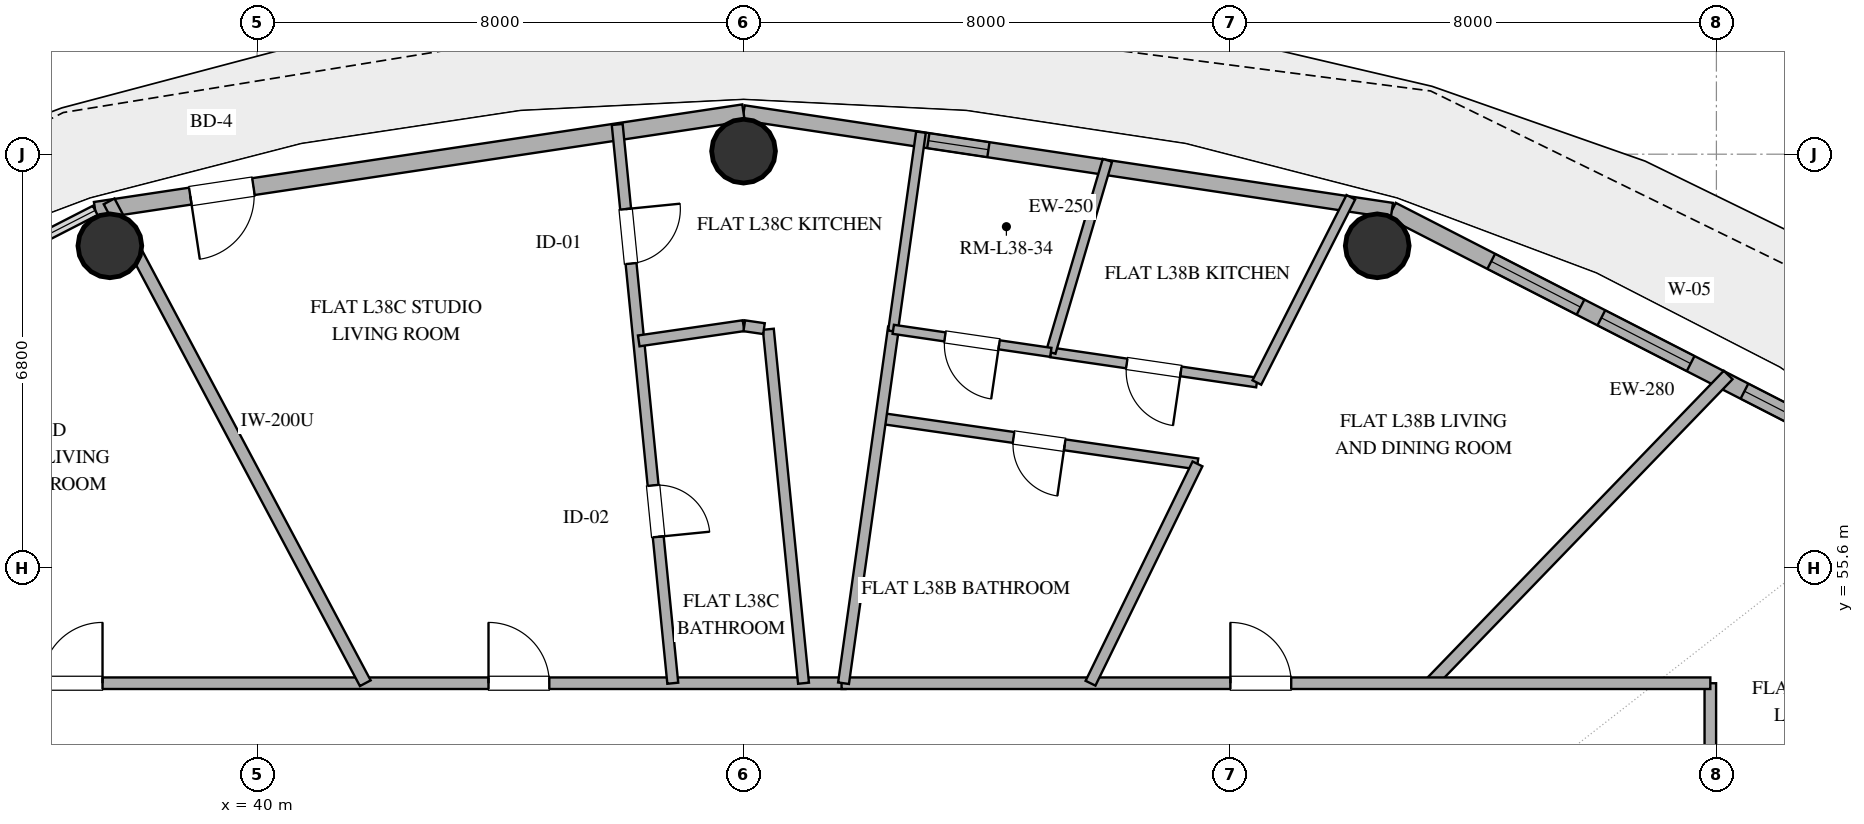
"""IFC4 building model, lengths in metres.
Left out: names, types, materials, properties, quantities, classifications, styles, units other than length and angle.
Written with IfcOpenShell. Run it as: python <this file> out.ifc"""

import sys

from ifc_helpers import new_model, si_unit, direction, frame, frame_2d, origin, origin_2d, place, context, subcontext, project, spatial, rectangle, hollow_circle, extrude, element, fill, save


model = new_model("IFC4")
c1 = context("Model", 3, precision=1e-05, world=origin(), true_north=direction((0.0, 1.0)))
c2 = subcontext(c1, "Body", "Model", "MODEL_VIEW")
j1 = project(units=[si_unit("LENGTHUNIT", "METRE"), si_unit("PLANEANGLEUNIT", "RADIAN")], contexts=[c1])
p1 = place(None, origin())
s1 = spatial("IfcSite", under=j1, at=p1, CompositionType="ELEMENT")
p2 = place(p1, origin())
s2 = spatial("IfcBuilding", under=s1, at=p2, CompositionType="ELEMENT")
p3 = place(p2, frame((0.0, 0.0, 154.2)))
s3 = spatial("IfcBuildingStorey", under=s2, at=p3, CompositionType="ELEMENT", Elevation=154.2)
for number, where, z_axis, x_axis in (
    (1, (58.422, 60.893, 0.0), (0.0, 0.0, 1.0), (1.0, 0.0, 0.0)),
    (2, (48.0, 62.45, 0.0), (0.0, 0.0, 1.0), (1.0, 0.0, 0.0)),
    (3, (37.578, 60.893, 0.0), (0.0, 0.0, 1.0), (1.0, 0.0, 0.0)),
):
    element("IfcColumn", number, at=place(p3, frame(where, z_axis=z_axis, x_axis=x_axis)), inside=s3, PredefinedType="COLUMN", context=c2, shape_type="SweptSolid", body=[
        extrude(hollow_circle(Radius=0.525, WallThickness=0.028, at=origin_2d()), origin(), (0.0, 0.0, 1.0), 3.38),
    ])
p4 = place(p3, frame((67.576, 56.906, 0.0), z_axis=(0.0, 0.0, 1.0), x_axis=(-0.889872523182, 0.456209263919, 0.0)))
e4 = element("IfcWall", 4, at=p4, inside=s3, PredefinedType="SOLIDWALL", context=c2, shape_type="SweptSolid", body=[
    extrude(rectangle(XDim=10.016, YDim=0.28, at=frame_2d((5.008, 0.0))), origin(), (0.0, 0.0, 1.0), 3.38),
])
p5 = place(p4, frame((1.7, 0.0, 0.85)))
e5 = element("IfcOpeningElement", 5, at=p5, cuts=e4, PredefinedType="OPENING", context=c2, shape_type="SweptSolid", body=[
    extrude(rectangle(XDim=1.8, YDim=2.2, at=frame_2d((0.9, 1.1))), frame((0.0, 0.15, 0.0), z_axis=(0.0, -1.0, 0.0), x_axis=(1.0, 0.0, 0.0)), (0.0, 0.0, 1.0), 0.3),
])
p6 = place(p4, frame((4.495, 0.0, 0.85)))
e6 = element("IfcOpeningElement", 6, at=p6, cuts=e4, PredefinedType="OPENING", context=c2, shape_type="SweptSolid", body=[
    extrude(rectangle(XDim=1.65, YDim=2.0, at=frame_2d((0.825, 1.0))), frame((0.0, 0.15, 0.0), z_axis=(0.0, -1.0, 0.0), x_axis=(1.0, 0.0, 0.0)), (0.0, 0.0, 1.0), 0.3),
])
p7 = place(p4, frame((6.53, 0.0, 0.85)))
e7 = element("IfcOpeningElement", 7, at=p7, cuts=e4, PredefinedType="OPENING", context=c2, shape_type="SweptSolid", body=[
    extrude(rectangle(XDim=1.65, YDim=2.0, at=frame_2d((0.825, 1.0))), frame((0.0, 0.15, 0.0), z_axis=(0.0, -1.0, 0.0), x_axis=(1.0, 0.0, 0.0)), (0.0, 0.0, 1.0), 0.3),
])
p8 = place(p3, frame((58.663, 61.475, 0.0), z_axis=(0.0, 0.0, 1.0), x_axis=(-0.988863993413, 0.148822049884, 0.0)))
e8 = element("IfcWall", 8, at=p8, inside=s3, PredefinedType="SOLIDWALL", context=c2, shape_type="SweptSolid", body=[
    extrude(rectangle(XDim=10.783, YDim=0.25, at=frame_2d((5.392, 0.0))), origin(), (0.0, 0.0, 1.0), 3.38),
])
p9 = place(p8, frame((6.71, 0.0, 0.35)))
e9 = element("IfcOpeningElement", 9, at=p9, cuts=e8, PredefinedType="OPENING", context=c2, shape_type="SweptSolid", body=[
    extrude(rectangle(XDim=1.0, YDim=1.05, at=frame_2d((0.5, 0.525))), frame((0.0, 0.135, 0.0), z_axis=(0.0, -1.0, 0.0), x_axis=(1.0, 0.0, 0.0)), (0.0, 0.0, 1.0), 0.27),
])
p10 = place(p3, frame((48.0, 63.08, 0.0), z_axis=(0.0, 0.0, 1.0), x_axis=(-0.988863993413, -0.148822049884, 0.0)))
e10 = element("IfcWall", 10, at=p10, inside=s3, PredefinedType="SOLIDWALL", context=c2, shape_type="SweptSolid", body=[
    extrude(rectangle(XDim=10.783, YDim=0.28, at=frame_2d((5.392, 0.0))), origin(), (0.0, 0.0, 1.0), 3.38),
])
p11 = place(p10, frame((8.151, 0.0, 0.0)))
e11 = element("IfcOpeningElement", 11, at=p11, cuts=e10, PredefinedType="OPENING", context=c2, shape_type="SweptSolid", body=[
    extrude(rectangle(XDim=1.05, YDim=2.2, at=frame_2d((0.525, 1.1))), frame((0.0, 0.15, 0.0), z_axis=(0.0, -1.0, 0.0), x_axis=(1.0, 0.0, 0.0)), (0.0, 0.0, 1.0), 0.3),
])
p12 = place(p3, frame((32.1, 53.7, 0.0), z_axis=(0.0, 0.0, 1.0), x_axis=(1.0, 0.0, 0.0)))
e12 = element("IfcWall", 12, at=p12, inside=s3, PredefinedType="PARTITIONING", context=c2, shape_type="SweptSolid", body=[
    extrude(rectangle(XDim=17.576, YDim=0.19, at=frame_2d((8.788, 0.0))), origin(), (0.0, 0.0, 1.0), 2.74),
])
p13 = place(p12, frame((4.358, 0.0, 0.0)))
e13 = element("IfcOpeningElement", 13, at=p13, cuts=e12, PredefinedType="OPENING", context=c2, shape_type="SweptSolid", body=[
    extrude(rectangle(XDim=1.0, YDim=2.2, at=frame_2d((0.5, 1.1))), frame((0.0, 0.105, 0.0), z_axis=(0.0, -1.0, 0.0), x_axis=(1.0, 0.0, 0.0)), (0.0, 0.0, 1.0), 0.21),
])
p14 = place(p12, frame((11.706, 0.0, 0.0)))
e14 = element("IfcOpeningElement", 14, at=p14, cuts=e12, PredefinedType="OPENING", context=c2, shape_type="SweptSolid", body=[
    extrude(rectangle(XDim=1.0, YDim=2.2, at=frame_2d((0.5, 1.1))), frame((0.0, 0.105, 0.0), z_axis=(0.0, -1.0, 0.0), x_axis=(1.0, 0.0, 0.0)), (0.0, 0.0, 1.0), 0.21),
])
p15 = place(p3, frame((37.566, 61.624, 0.0), z_axis=(0.0, 0.0, 1.0), x_axis=(0.469466796814, -0.882950126955, 0.0)))
e15 = element("IfcWall", 15, at=p15, inside=s3, PredefinedType="PARTITIONING", context=c2, shape_type="SweptSolid", body=[
    extrude(rectangle(XDim=8.975, YDim=0.2, at=frame_2d((4.487, 0.0))), origin(), (0.0, 0.0, 1.0), 2.74),
])
p16 = place(p3, frame((64.194, 58.769, 0.0), z_axis=(0.0, 0.0, 1.0), x_axis=(-0.694647685064, -0.719350118952, 0.0)))
e16 = element("IfcWall", 16, at=p16, inside=s3, PredefinedType="PARTITIONING", context=c2, shape_type="SweptSolid", body=[
    extrude(rectangle(XDim=7.047, YDim=0.2, at=frame_2d((3.523, 0.0))), origin(), (0.0, 0.0, 1.0), 2.74),
])
p17 = place(p3, frame((63.9, 53.7, 0.0), z_axis=(0.0, 0.0, 1.0), x_axis=(0.0, -1.0, 0.0)))
e17 = element("IfcWall", 17, at=p17, inside=s3, PredefinedType="PARTITIONING", context=c2, shape_type="SweptSolid", body=[
    extrude(rectangle(XDim=10.62, YDim=0.19, at=frame_2d((5.31, 0.0))), origin(), (0.0, 0.0, 1.0), 2.74),
])
p18 = place(p17, frame((2.48, 0.0, 0.0)))
e18 = element("IfcOpeningElement", 18, at=p18, cuts=e17, PredefinedType="OPENING", context=c2, shape_type="SweptSolid", body=[
    extrude(rectangle(XDim=1.0, YDim=2.2, at=frame_2d((0.5, 1.1))), frame((0.0, 0.105, 0.0), z_axis=(0.0, -1.0, 0.0), x_axis=(1.0, 0.0, 0.0)), (0.0, 0.0, 1.0), 0.21),
])
p19 = place(p3, frame((48.407, 59.521, 0.0), z_axis=(0.0, 0.0, 1.0), x_axis=(0.098958231484, -0.995091587956, 0.0)))
e19 = element("IfcWall", 19, at=p19, inside=s3, PredefinedType="PLUMBINGWALL", context=c2, shape_type="SweptSolid", body=[
    extrude(rectangle(XDim=5.85, YDim=0.18, at=frame_2d((2.925, 0.0))), origin(), (0.0, 0.0, 1.0), 2.74),
])
p20 = place(p3, frame((45.922, 62.888, 0.0), z_axis=(0.0, 0.0, 1.0), x_axis=(0.098964435759, -0.995090970944, 0.0)))
e20 = element("IfcWall", 20, at=p20, inside=s3, PredefinedType="PLUMBINGWALL", context=c2, shape_type="SweptSolid", body=[
    extrude(rectangle(XDim=9.234, YDim=0.18, at=frame_2d((4.617, 0.0))), origin(), (0.0, 0.0, 1.0), 2.74),
])
p21 = place(p20, frame((5.964, 0.0, 0.0)))
e21 = element("IfcOpeningElement", 21, at=p21, cuts=e20, PredefinedType="OPENING", context=c2, shape_type="SweptSolid", body=[
    extrude(rectangle(XDim=0.85, YDim=2.1, at=frame_2d((0.425, 1.05))), frame((0.0, 0.1, 0.0), z_axis=(0.0, -1.0, 0.0), x_axis=(1.0, 0.0, 0.0)), (0.0, 0.0, 1.0), 0.2),
])
p22 = place(p20, frame((1.398, 0.0, 0.0)))
e22 = element("IfcOpeningElement", 22, at=p22, cuts=e20, PredefinedType="OPENING", context=c2, shape_type="SweptSolid", body=[
    extrude(rectangle(XDim=0.9, YDim=2.1, at=frame_2d((0.45, 1.05))), frame((0.0, 0.1, 0.0), z_axis=(0.0, -1.0, 0.0), x_axis=(1.0, 0.0, 0.0)), (0.0, 0.0, 1.0), 0.2),
])
p23 = place(p3, frame((49.612, 53.7, 0.0), z_axis=(0.0, 0.0, 1.0), x_axis=(1.0, 0.0, 0.0)))
e23 = element("IfcWall", 23, at=p23, inside=s3, PredefinedType="PARTITIONING", context=c2, shape_type="SweptSolid", body=[
    extrude(rectangle(XDim=14.288, YDim=0.19, at=frame_2d((7.144, 0.0))), origin(), (0.0, 0.0, 1.0), 2.74),
])
p24 = place(p23, frame((6.395, 0.0, 0.0)))
e24 = element("IfcOpeningElement", 24, at=p24, cuts=e23, PredefinedType="OPENING", context=c2, shape_type="SweptSolid", body=[
    extrude(rectangle(XDim=1.0, YDim=2.2, at=frame_2d((0.5, 1.1))), frame((0.0, 0.105, 0.0), z_axis=(0.0, -1.0, 0.0), x_axis=(1.0, 0.0, 0.0)), (0.0, 0.0, 1.0), 0.21),
])
p25 = place(p3, frame((55.466, 57.307, 0.0), z_axis=(0.0, 0.0, 1.0), x_axis=(-0.989825713309, 0.142285126674, 0.0)))
e25 = element("IfcWall", 25, at=p25, inside=s3, PredefinedType="PLUMBINGWALL", context=c2, shape_type="SweptSolid", body=[
    extrude(rectangle(XDim=5.262, YDim=0.18, at=frame_2d((2.631, 0.0))), origin(), (0.0, 0.0, 1.0), 2.74),
])
p26 = place(p25, frame((2.206, 0.0, 0.0)))
e26 = element("IfcOpeningElement", 26, at=p26, cuts=e25, PredefinedType="OPENING", context=c2, shape_type="SweptSolid", body=[
    extrude(rectangle(XDim=0.85, YDim=2.1, at=frame_2d((0.425, 1.05))), frame((0.0, 0.1, 0.0), z_axis=(0.0, -1.0, 0.0), x_axis=(1.0, 0.0, 0.0)), (0.0, 0.0, 1.0), 0.2),
])
p27 = place(p3, frame((50.467, 59.552, 0.0), z_axis=(0.0, 0.0, 1.0), x_axis=(-0.139194058732, -0.990265123093, 0.0)))
e27 = element("IfcWall", 27, at=p27, inside=s3, PredefinedType="PLUMBINGWALL", context=c2, shape_type="SweptSolid", body=[
    extrude(rectangle(XDim=5.909, YDim=0.18, at=frame_2d((2.955, 0.0))), origin(), (0.0, 0.0, 1.0), 2.74),
])
p28 = place(p3, frame((53.707, 53.7, 0.0), z_axis=(0.0, 0.0, 1.0), x_axis=(0.438333733087, 0.898812293217, 0.0)))
e28 = element("IfcWall", 28, at=p28, inside=s3, PredefinedType="PLUMBINGWALL", context=c2, shape_type="SweptSolid", body=[
    extrude(rectangle(XDim=4.013, YDim=0.18, at=frame_2d((2.006, 0.0))), origin(), (0.0, 0.0, 1.0), 2.74),
])
p29 = place(p3, frame((56.442, 58.645, 0.0), z_axis=(0.0, 0.0, 1.0), x_axis=(-0.989476501308, 0.144693653483, 0.0)))
e29 = element("IfcWall", 29, at=p29, inside=s3, PredefinedType="PLUMBINGWALL", context=c2, shape_type="SweptSolid", body=[
    extrude(rectangle(XDim=3.425, YDim=0.16, at=frame_2d((1.713, 0.0))), origin(), (0.0, 0.0, 1.0), 2.74),
])
p30 = place(p29, frame((1.263, 0.0, 0.0)))
e30 = element("IfcOpeningElement", 30, at=p30, cuts=e29, PredefinedType="OPENING", context=c2, shape_type="SweptSolid", body=[
    extrude(rectangle(XDim=0.9, YDim=2.1, at=frame_2d((0.45, 1.05))), frame((0.0, 0.09, 0.0), z_axis=(0.0, -1.0, 0.0), x_axis=(1.0, 0.0, 0.0)), (0.0, 0.0, 1.0), 0.18),
])
p31 = place(p3, frame((57.988, 61.692, 0.0), z_axis=(0.0, 0.0, 1.0), x_axis=(-0.452408261564, -0.89181094682, 0.0)))
e31 = element("IfcWall", 31, at=p31, inside=s3, PredefinedType="PLUMBINGWALL", context=c2, shape_type="SweptSolid", body=[
    extrude(rectangle(XDim=3.417, YDim=0.16, at=frame_2d((1.708, 0.0))), origin(), (0.0, 0.0, 1.0), 2.74),
])
p32 = place(p3, frame((50.918, 62.762, 0.0), z_axis=(0.0, 0.0, 1.0), x_axis=(-0.139198258336, -0.990264532777, 0.0)))
e32 = element("IfcWall", 32, at=p32, inside=s3, PredefinedType="PLUMBINGWALL", context=c2, shape_type="SweptSolid", body=[
    extrude(rectangle(XDim=3.306, YDim=0.16, at=frame_2d((1.653, 0.0))), origin(), (0.0, 0.0, 1.0), 2.74),
])
p33 = place(p3, frame((53.053, 59.141, 0.0), z_axis=(0.0, 0.0, 1.0), x_axis=(0.282828521875, 0.959170489128, 0.0)))
e33 = element("IfcWall", 33, at=p33, inside=s3, PredefinedType="PLUMBINGWALL", context=c2, shape_type="SweptSolid", body=[
    extrude(rectangle(XDim=3.293, YDim=0.16, at=frame_2d((1.646, 0.0))), origin(), (0.0, 0.0, 1.0), 2.74),
])
p34 = place(p3, frame((53.053, 59.141, 0.0), z_axis=(0.0, 0.0, 1.0), x_axis=(-0.989458783037, 0.144814766757, 0.0)))
e34 = element("IfcWall", 34, at=p34, inside=s3, PredefinedType="PARTITIONING", context=c2, shape_type="SweptSolid", body=[
    extrude(rectangle(XDim=2.618, YDim=0.15, at=frame_2d((1.309, 0.0))), origin(), (0.0, 0.0, 1.0), 2.74),
])
p35 = place(p34, frame((0.859, 0.0, 0.0)))
e35 = element("IfcOpeningElement", 35, at=p35, cuts=e34, PredefinedType="OPENING", context=c2, shape_type="SweptSolid", body=[
    extrude(rectangle(XDim=0.9, YDim=2.1, at=frame_2d((0.45, 1.05))), frame((0.0, 0.085, 0.0), z_axis=(0.0, -1.0, 0.0), x_axis=(1.0, 0.0, 0.0)), (0.0, 0.0, 1.0), 0.17),
])
p36 = place(p3, frame((46.276, 59.33, 0.0), z_axis=(0.0, 0.0, 1.0), x_axis=(0.989604582355, 0.143815056869, 0.0)))
e36 = element("IfcWall", 36, at=p36, inside=s3, PredefinedType="PLUMBINGWALL", context=c2, shape_type="SweptSolid", body=[
    extrude(rectangle(XDim=1.742, YDim=0.18, at=frame_2d((0.871, 0.0))), origin(), (0.0, 0.0, 1.0), 2.74),
])
p37 = place(p3, frame((48.012, 59.578, 0.0), z_axis=(0.0, 0.0, 1.0), x_axis=(0.989603801202, -0.143820431952, 0.0)))
e37 = element("IfcWall", 37, at=p37, inside=s3, PredefinedType="PLUMBINGWALL", context=c2, shape_type="SweptSolid", body=[
    extrude(rectangle(XDim=0.328, YDim=0.18, at=frame_2d((0.164, 0.0))), origin(), (0.0, 0.0, 1.0), 2.74),
])
p38 = place(p5, origin())
e38 = element("IfcWindow", 38, at=p38, inside=s3, PartitioningType="SINGLE_PANEL", PredefinedType="WINDOW", context=c2, shape_type="SweptSolid", body=[
    extrude(rectangle(XDim=1.8, YDim=2.2, at=frame_2d((0.9, 1.1))), frame((0.0, 0.03, 0.0), z_axis=(0.0, -1.0, 0.0), x_axis=(1.0, 0.0, 0.0)), (0.0, 0.0, 1.0), 0.06),
])
fill(e5, e38)
p39 = place(p6, origin())
e39 = element("IfcWindow", 39, at=p39, inside=s3, PartitioningType="SINGLE_PANEL", PredefinedType="WINDOW", context=c2, shape_type="SweptSolid", body=[
    extrude(rectangle(XDim=1.65, YDim=2.0, at=frame_2d((0.825, 1.0))), frame((0.0, 0.03, 0.0), z_axis=(0.0, -1.0, 0.0), x_axis=(1.0, 0.0, 0.0)), (0.0, 0.0, 1.0), 0.06),
])
fill(e6, e39)
p40 = place(p7, origin())
e40 = element("IfcWindow", 40, at=p40, inside=s3, PartitioningType="SINGLE_PANEL", PredefinedType="WINDOW", context=c2, shape_type="SweptSolid", body=[
    extrude(rectangle(XDim=1.65, YDim=2.0, at=frame_2d((0.825, 1.0))), frame((0.0, 0.03, 0.0), z_axis=(0.0, -1.0, 0.0), x_axis=(1.0, 0.0, 0.0)), (0.0, 0.0, 1.0), 0.06),
])
fill(e7, e40)
p41 = place(p11, origin())
e41 = element("IfcDoor", 41, at=p41, inside=s3, OperationType="SINGLE_SWING_RIGHT", PredefinedType="DOOR", context=c2, shape_type="SweptSolid", body=[
    extrude(rectangle(XDim=1.05, YDim=2.2, at=frame_2d((0.525, 1.1))), frame((0.0, 0.025, 0.0), z_axis=(0.0, -1.0, 0.0), x_axis=(1.0, 0.0, 0.0)), (0.0, 0.0, 1.0), 0.05),
])
fill(e11, e41)
p42 = place(p9, origin())
e42 = element("IfcWindow", 42, at=p42, inside=s3, PartitioningType="SINGLE_PANEL", PredefinedType="WINDOW", context=c2, shape_type="SweptSolid", body=[
    extrude(rectangle(XDim=1.0, YDim=1.05, at=frame_2d((0.5, 0.525))), frame((0.0, 0.03, 0.0), z_axis=(0.0, -1.0, 0.0), x_axis=(1.0, 0.0, 0.0)), (0.0, 0.0, 1.0), 0.06),
])
fill(e9, e42)
p43 = place(p13, origin())
e43 = element("IfcDoor", 43, at=p43, inside=s3, OperationType="SINGLE_SWING_RIGHT", PredefinedType="DOOR", context=c2, shape_type="SweptSolid", body=[
    extrude(rectangle(XDim=1.0, YDim=2.2, at=frame_2d((0.5, 1.1))), frame((0.0, 0.025, 0.0), z_axis=(0.0, -1.0, 0.0), x_axis=(1.0, 0.0, 0.0)), (0.0, 0.0, 1.0), 0.05),
])
fill(e13, e43)
p44 = place(p14, origin())
e44 = element("IfcDoor", 44, at=p44, inside=s3, OperationType="SINGLE_SWING_LEFT", PredefinedType="DOOR", context=c2, shape_type="SweptSolid", body=[
    extrude(rectangle(XDim=1.0, YDim=2.2, at=frame_2d((0.5, 1.1))), frame((0.0, 0.025, 0.0), z_axis=(0.0, -1.0, 0.0), x_axis=(1.0, 0.0, 0.0)), (0.0, 0.0, 1.0), 0.05),
])
fill(e14, e44)
p45 = place(p21, origin())
e45 = element("IfcDoor", 45, at=p45, inside=s3, OperationType="SINGLE_SWING_RIGHT", PredefinedType="DOOR", context=c2, shape_type="SweptSolid", body=[
    extrude(rectangle(XDim=0.85, YDim=2.1, at=frame_2d((0.425, 1.05))), frame((0.0, 0.025, 0.0), z_axis=(0.0, -1.0, 0.0), x_axis=(1.0, 0.0, 0.0)), (0.0, 0.0, 1.0), 0.05),
])
fill(e21, e45)
p46 = place(p22, origin())
e46 = element("IfcDoor", 46, at=p46, inside=s3, OperationType="SINGLE_SWING_LEFT", PredefinedType="DOOR", context=c2, shape_type="SweptSolid", body=[
    extrude(rectangle(XDim=0.9, YDim=2.1, at=frame_2d((0.45, 1.05))), frame((0.0, 0.025, 0.0), z_axis=(0.0, -1.0, 0.0), x_axis=(1.0, 0.0, 0.0)), (0.0, 0.0, 1.0), 0.05),
])
fill(e22, e46)
p47 = place(p24, origin())
e47 = element("IfcDoor", 47, at=p47, inside=s3, OperationType="SINGLE_SWING_LEFT", PredefinedType="DOOR", context=c2, shape_type="SweptSolid", body=[
    extrude(rectangle(XDim=1.0, YDim=2.2, at=frame_2d((0.5, 1.1))), frame((0.0, 0.025, 0.0), z_axis=(0.0, -1.0, 0.0), x_axis=(1.0, 0.0, 0.0)), (0.0, 0.0, 1.0), 0.05),
])
fill(e24, e47)
p48 = place(p26, origin())
e48 = element("IfcDoor", 48, at=p48, inside=s3, OperationType="SINGLE_SWING_LEFT", PredefinedType="DOOR", context=c2, shape_type="SweptSolid", body=[
    extrude(rectangle(XDim=0.85, YDim=2.1, at=frame_2d((0.425, 1.05))), frame((0.0, 0.025, 0.0), z_axis=(0.0, -1.0, 0.0), x_axis=(1.0, 0.0, 0.0)), (0.0, 0.0, 1.0), 0.05),
])
fill(e26, e48)
p49 = place(p30, origin())
e49 = element("IfcDoor", 49, at=p49, inside=s3, OperationType="SINGLE_SWING_LEFT", PredefinedType="DOOR", context=c2, shape_type="SweptSolid", body=[
    extrude(rectangle(XDim=0.9, YDim=2.1, at=frame_2d((0.45, 1.05))), frame((0.0, 0.025, 0.0), z_axis=(0.0, -1.0, 0.0), x_axis=(1.0, 0.0, 0.0)), (0.0, 0.0, 1.0), 0.05),
])
fill(e30, e49)
p50 = place(p35, origin())
e50 = element("IfcDoor", 50, at=p50, inside=s3, OperationType="SINGLE_SWING_LEFT", PredefinedType="DOOR", context=c2, shape_type="SweptSolid", body=[
    extrude(rectangle(XDim=0.9, YDim=2.1, at=frame_2d((0.45, 1.05))), frame((0.0, 0.025, 0.0), z_axis=(0.0, -1.0, 0.0), x_axis=(1.0, 0.0, 0.0)), (0.0, 0.0, 1.0), 0.05),
])
fill(e35, e50)
save(model, sys.argv[1])
